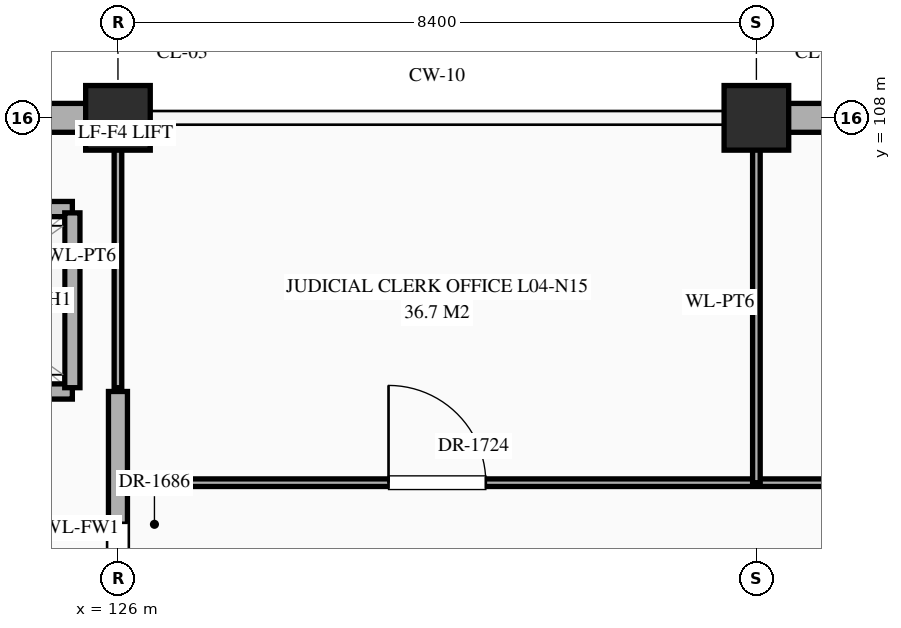
"""IFC4 building model, lengths in metres.
Left out: names, types, materials, properties, quantities, classifications, styles, units other than length and angle.
Written with IfcOpenShell. Run it as: python <this file> out.ifc"""

import sys

from ifc_helpers import new_model, si_unit, direction, frame, frame_2d, origin, origin_2d, place, context, subcontext, project, spatial, rectangle, extrude, element, fill, save


model = new_model("IFC4")
c1 = context("Model", 3, precision=1e-05, world=origin(), true_north=direction((0.0, 1.0)))
c2 = subcontext(c1, "Body", "Model", "MODEL_VIEW")
j1 = project(units=[si_unit("LENGTHUNIT", "METRE"), si_unit("PLANEANGLEUNIT", "RADIAN")], contexts=[c1])
p1 = place(None, origin())
s1 = spatial("IfcSite", under=j1, at=p1, CompositionType="ELEMENT")
p2 = place(p1, origin())
s2 = spatial("IfcBuilding", under=s1, at=p2, CompositionType="ELEMENT")
p3 = place(p2, frame((0.0, 0.0, 16.2)))
s3 = spatial("IfcBuildingStorey", under=s2, at=p3, CompositionType="ELEMENT", Elevation=16.2)
for number, where, z_axis, x_axis in (
    (1, (126.0, 108.0, 0.0), (0.0, 0.0, 1.0), (1.0, 0.0, 0.0)),
    (2, (134.4, 108.0, 0.0), (0.0, 0.0, 1.0), (1.0, 0.0, 0.0)),
):
    element("IfcColumn", number, at=place(p3, frame(where, z_axis=z_axis, x_axis=x_axis)), inside=s3, PredefinedType="COLUMN", context=c2, shape_type="SweptSolid", body=[
        extrude(rectangle(XDim=0.85, YDim=0.85, at=origin_2d()), origin(), (0.0, 0.0, 1.0), 5.4),
    ])
p4 = place(p3, frame((118.045, 108.0, 0.0), z_axis=(0.0, 0.0, 1.0), x_axis=(1.0, 0.0, 0.0)))
e3 = element("IfcWall", 3, at=p4, inside=s3, PredefinedType="STANDARD", context=c2, shape_type="SweptSolid", body=[
    extrude(rectangle(XDim=7.535, YDim=0.38, at=frame_2d((3.768, 0.0))), origin(), (0.0, 0.0, 1.0), 4.47),
])
p5 = place(p3, frame((134.82, 108.0, 0.0), z_axis=(0.0, 0.0, 1.0), x_axis=(1.0, 0.0, 0.0)))
e4 = element("IfcWall", 4, at=p5, inside=s3, PredefinedType="STANDARD", context=c2, shape_type="SweptSolid", body=[
    extrude(rectangle(XDim=7.56, YDim=0.38, at=frame_2d((3.78, 0.0))), origin(), (0.0, 0.0, 1.0), 4.47),
])
p6 = place(p5, frame((5.33, 0.0, 0.85)))
e5 = element("IfcOpeningElement", 5, at=p6, cuts=e4, PredefinedType="OPENING", context=c2, shape_type="SweptSolid", body=[
    extrude(rectangle(XDim=0.9, YDim=1.2, at=frame_2d((0.45, 0.6))), frame((0.0, 0.202, 0.0), z_axis=(0.0, -1.0, 0.0), x_axis=(1.0, 0.0, 0.0)), (0.0, 0.0, 1.0), 0.404),
])
p7 = place(p3, frame((126.0, 103.2, 0.0), z_axis=(0.0, 0.0, 1.0), x_axis=(1.0, 0.0, 0.0)))
e6 = element("IfcWall", 6, at=p7, inside=s3, PredefinedType="STANDARD", context=c2, shape_type="SweptSolid", body=[
    extrude(rectangle(XDim=41.96, YDim=0.1, at=frame_2d((20.98, 0.0))), origin(), (0.0, 0.0, 1.0), 5.05),
])
p8 = place(p7, frame((3.56, 0.0, 0.0)))
e7 = element("IfcOpeningElement", 7, at=p8, cuts=e6, PredefinedType="OPENING", context=c2, shape_type="SweptSolid", body=[
    extrude(rectangle(XDim=1.28, YDim=2.35, at=frame_2d((0.64, 1.175))), frame((0.0, 0.062, 0.0), z_axis=(0.0, -1.0, 0.0), x_axis=(1.0, 0.0, 0.0)), (0.0, 0.0, 1.0), 0.124),
])
p9 = place(p7, frame((12.13, 0.0, 0.0)))
e8 = element("IfcOpeningElement", 8, at=p9, cuts=e6, PredefinedType="OPENING", context=c2, shape_type="SweptSolid", body=[
    extrude(rectangle(XDim=0.94, YDim=2.3, at=frame_2d((0.47, 1.15))), frame((0.0, 0.062, 0.0), z_axis=(0.0, -1.0, 0.0), x_axis=(1.0, 0.0, 0.0)), (0.0, 0.0, 1.0), 0.124),
])
p10 = place(p7, frame((20.51, 0.0, 0.0)))
e9 = element("IfcOpeningElement", 9, at=p10, cuts=e6, PredefinedType="OPENING", context=c2, shape_type="SweptSolid", body=[
    extrude(rectangle(XDim=0.98, YDim=2.35, at=frame_2d((0.49, 1.175))), frame((0.0, 0.062, 0.0), z_axis=(0.0, -1.0, 0.0), x_axis=(1.0, 0.0, 0.0)), (0.0, 0.0, 1.0), 0.124),
])
p11 = place(p7, frame((28.89, 0.0, 0.0)))
e10 = element("IfcOpeningElement", 10, at=p11, cuts=e6, PredefinedType="OPENING", context=c2, shape_type="SweptSolid", body=[
    extrude(rectangle(XDim=1.02, YDim=2.4, at=frame_2d((0.51, 1.2))), frame((0.0, 0.062, 0.0), z_axis=(0.0, -1.0, 0.0), x_axis=(1.0, 0.0, 0.0)), (0.0, 0.0, 1.0), 0.124),
])
p12 = place(p7, frame((37.25, 0.0, 0.0)))
e11 = element("IfcOpeningElement", 11, at=p12, cuts=e6, PredefinedType="OPENING", context=c2, shape_type="SweptSolid", body=[
    extrude(rectangle(XDim=1.06, YDim=2.4, at=frame_2d((0.53, 1.2))), frame((0.0, 0.062, 0.0), z_axis=(0.0, -1.0, 0.0), x_axis=(1.0, 0.0, 0.0)), (0.0, 0.0, 1.0), 0.124),
])
p13 = place(p3, frame((122.4, 104.4, 0.0), z_axis=(0.0, 0.0, 1.0), x_axis=(1.0, 0.0, 0.0)))
e12 = element("IfcWall", 12, at=p13, inside=s3, PredefinedType="STANDARD", context=c2, shape_type="SweptSolid", body=[
    extrude(rectangle(XDim=3.0, YDim=0.2, at=frame_2d((1.5, 0.0))), origin(), (0.0, 0.0, 1.0), 5.12),
])
p14 = place(p13, frame((0.9, 0.0, 0.0)))
e13 = element("IfcOpeningElement", 13, at=p14, cuts=e12, PredefinedType="OPENING", context=c2, shape_type="SweptSolid", body=[
    extrude(rectangle(XDim=1.2, YDim=2.15, at=frame_2d((0.6, 1.075))), frame((0.0, 0.112, 0.0), z_axis=(0.0, -1.0, 0.0), x_axis=(1.0, 0.0, 0.0)), (0.0, 0.0, 1.0), 0.224),
])
p15 = place(p3, frame((122.4, 106.8, 0.0), z_axis=(0.0, 0.0, 1.0), x_axis=(1.0, 0.0, 0.0)))
e14 = element("IfcWall", 14, at=p15, inside=s3, PredefinedType="STANDARD", context=c2, shape_type="SweptSolid", body=[
    extrude(rectangle(XDim=3.0, YDim=0.2, at=frame_2d((1.5, 0.0))), origin(), (0.0, 0.0, 1.0), 5.12),
])
p16 = place(p3, frame((125.4, 104.45, 0.0), z_axis=(0.0, 0.0, 1.0), x_axis=(0.0, 1.0, 0.0)))
e15 = element("IfcWall", 15, at=p16, inside=s3, PredefinedType="STANDARD", context=c2, shape_type="SweptSolid", body=[
    extrude(rectangle(XDim=2.3, YDim=0.2, at=frame_2d((1.15, 0.0))), origin(), (0.0, 0.0, 1.0), 5.12),
])
p17 = place(p3, frame((126.0, 100.8, 0.0), z_axis=(0.0, 0.0, 1.0), x_axis=(0.0, 1.0, 0.0)))
e16 = element("IfcWall", 16, at=p17, inside=s3, PredefinedType="STANDARD", context=c2, shape_type="SweptSolid", body=[
    extrude(rectangle(XDim=3.6, YDim=0.25, at=frame_2d((1.8, 0.0))), origin(), (0.0, 0.0, 1.0), 4.37),
])
p18 = place(p17, frame((0.873, 0.0, 0.0)))
e17 = element("IfcOpeningElement", 17, at=p18, cuts=e16, PredefinedType="OPENING", context=c2, shape_type="SweptSolid", body=[
    extrude(rectangle(XDim=1.0, YDim=2.2, at=frame_2d((0.5, 1.1))), frame((0.0, 0.137, 0.0), z_axis=(0.0, -1.0, 0.0), x_axis=(1.0, 0.0, 0.0)), (0.0, 0.0, 1.0), 0.274),
])
p19 = place(p3, frame((126.0, 104.45, 0.0), z_axis=(0.0, 0.0, 1.0), x_axis=(0.0, 1.0, 0.0)))
e18 = element("IfcWall", 18, at=p19, inside=s3, PredefinedType="STANDARD", context=c2, shape_type="SweptSolid", body=[
    extrude(rectangle(XDim=3.46, YDim=0.1, at=frame_2d((1.73, 0.0))), origin(), (0.0, 0.0, 1.0), 4.37),
])
p20 = place(p3, frame((134.4, 103.2, 0.0), z_axis=(0.0, 0.0, 1.0), x_axis=(0.0, 1.0, 0.0)))
e19 = element("IfcWall", 19, at=p20, inside=s3, PredefinedType="STANDARD", context=c2, shape_type="SweptSolid", body=[
    extrude(rectangle(XDim=4.76, YDim=0.1, at=frame_2d((2.38, 0.0))), origin(), (0.0, 0.0, 1.0), 4.37),
])
p21 = place(p18, origin())
e20 = element("IfcDoor", 20, at=p21, inside=s3, OperationType="SINGLE_SWING_RIGHT", PredefinedType="DOOR", context=c2, shape_type="SweptSolid", body=[
    extrude(rectangle(XDim=1.0, YDim=2.2, at=frame_2d((0.5, 1.1))), frame((0.0, 0.025, 0.0), z_axis=(0.0, -1.0, 0.0), x_axis=(1.0, 0.0, 0.0)), (0.0, 0.0, 1.0), 0.05),
])
fill(e17, e20)
p22 = place(p8, origin())
e21 = element("IfcDoor", 21, at=p22, inside=s3, OperationType="SINGLE_SWING_LEFT", PredefinedType="DOOR", context=c2, shape_type="SweptSolid", body=[
    extrude(rectangle(XDim=1.28, YDim=2.35, at=frame_2d((0.64, 1.175))), frame((0.0, 0.025, 0.0), z_axis=(0.0, -1.0, 0.0), x_axis=(1.0, 0.0, 0.0)), (0.0, 0.0, 1.0), 0.05),
])
fill(e7, e21)
save(model, sys.argv[1])
